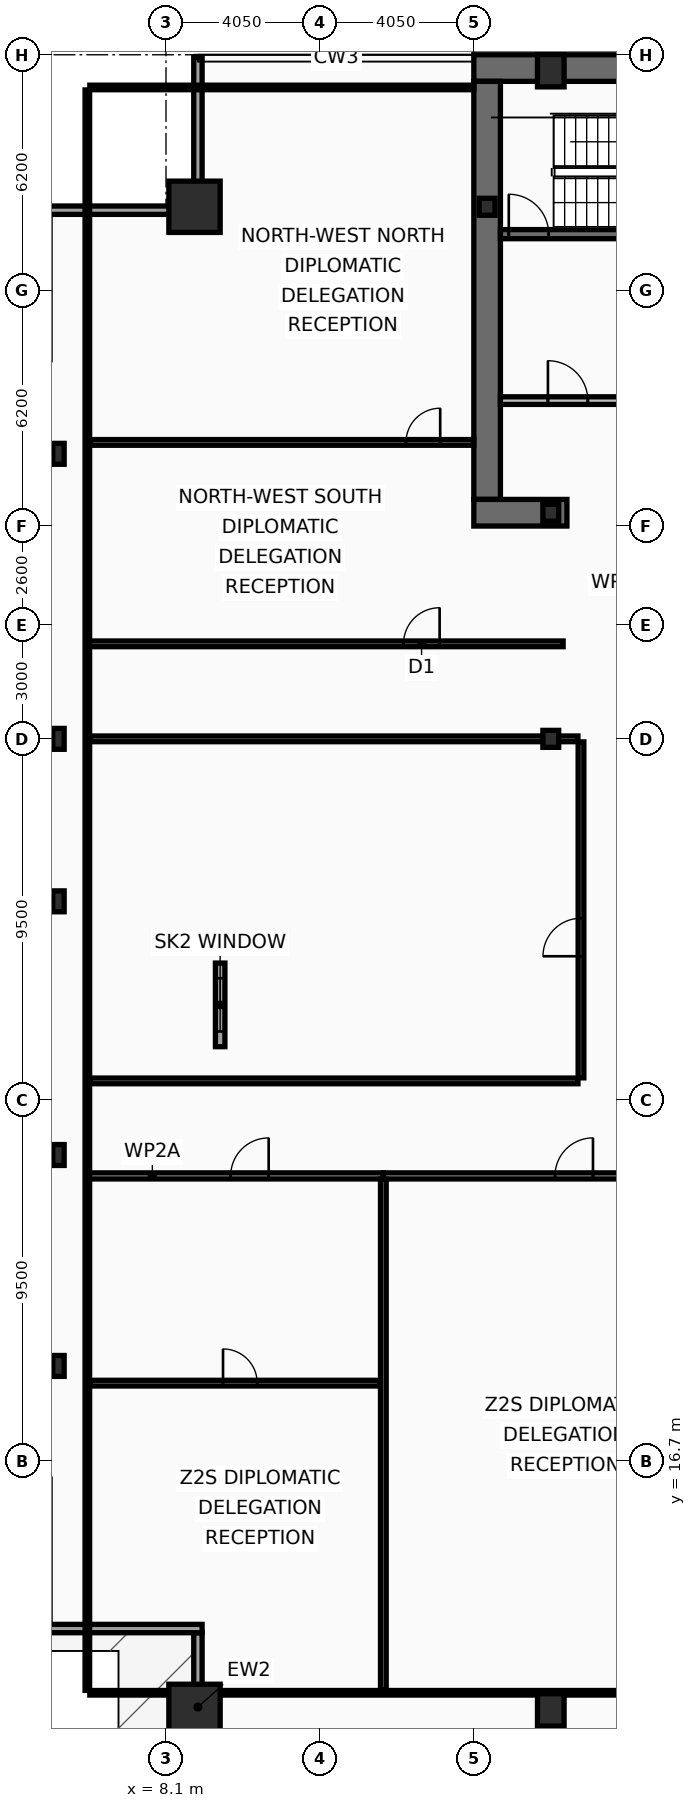
"""IFC4 building model, lengths in metres.
Left out: names, types, materials, properties, quantities, classifications, styles, units other than length and angle.
Written with IfcOpenShell. Run it as: python <this file> out.ifc"""

import sys

from ifc_helpers import new_model, si_unit, direction, frame, frame_2d, origin, origin_2d, place, context, subcontext, project, spatial, rectangle, hollow_rectangle, i_section, extrude, element, fill, save


model = new_model("IFC4")
c1 = context("Model", 3, precision=1e-05, world=origin(), true_north=direction((0.0, 1.0)))
c2 = subcontext(c1, "Body", "Model", "MODEL_VIEW")
j1 = project(units=[si_unit("LENGTHUNIT", "METRE"), si_unit("PLANEANGLEUNIT", "RADIAN")], contexts=[c1])
p1 = place(None, origin())
s1 = spatial("IfcSite", under=j1, at=p1, CompositionType="ELEMENT")
p2 = place(p1, origin())
s2 = spatial("IfcBuilding", under=s1, at=p2, CompositionType="ELEMENT")
p3 = place(p2, frame((0.0, 0.0, 136.2)))
s3 = spatial("IfcBuildingStorey", under=s2, at=p3, CompositionType="ELEMENT", Elevation=136.2)
p4 = place(p3, frame((16.2, 53.35, 0.0), z_axis=(0.0, 0.0, 1.0), x_axis=(1.0, 0.0, 0.0)))
e1 = element("IfcWall", 1, at=p4, inside=s3, PredefinedType="SHEAR", context=c2, shape_type="SweptSolid", body=[
    extrude(rectangle(XDim=40.5, YDim=0.7, at=frame_2d((20.25, 0.0))), origin(), (0.0, 0.0, 1.0), 3.44),
])
p5 = place(p3, frame((16.55, 42.0, 0.0), z_axis=(0.0, 0.0, 1.0), x_axis=(0.0, 1.0, 0.0)))
e2 = element("IfcWall", 2, at=p5, inside=s3, PredefinedType="SHEAR", context=c2, shape_type="SweptSolid", body=[
    extrude(rectangle(XDim=11.0, YDim=0.7, at=frame_2d((5.5, 0.0))), origin(), (0.0, 0.0, 1.0), 3.44),
])
p6 = place(p3, frame((18.65, 41.65, 0.0), z_axis=(0.0, 0.0, 1.0), x_axis=(-1.0, 0.0, 0.0)))
e3 = element("IfcWall", 3, at=p6, inside=s3, PredefinedType="SHEAR", context=c2, shape_type="SweptSolid", body=[
    extrude(rectangle(XDim=2.45, YDim=0.7, at=frame_2d((1.225, 0.0))), origin(), (0.0, 0.0, 1.0), 3.44),
])
p7 = place(p3, frame((16.9, 48.98, 0.0), z_axis=(0.0, 0.0, 1.0), x_axis=(1.0, 0.0, 0.0)))
e4 = element("IfcWall", 4, at=p7, inside=s3, PredefinedType="SHEAR", context=c2, shape_type="SweptSolid", body=[
    extrude(rectangle(XDim=7.32, YDim=0.24, at=frame_2d((3.66, 0.0))), origin(), (0.0, 0.0, 1.0), 3.44),
])
p8 = place(p7, frame((0.22, 0.0, 0.0)))
e5 = element("IfcOpeningElement", 5, at=p8, cuts=e4, PredefinedType="OPENING", context=c2, shape_type="SweptSolid", body=[
    extrude(rectangle(XDim=1.05, YDim=2.15, at=frame_2d((0.525, 1.075))), frame((0.0, 0.13, 0.0), z_axis=(0.0, -1.0, 0.0), x_axis=(1.0, 0.0, 0.0)), (0.0, 0.0, 1.0), 0.26),
])
for number, where, z_axis, x_axis in (
    (6, (8.85, 10.15, 0.0), (0.0, 0.0, 1.0), (1.0, 0.0, 0.0)),
    (7, (8.85, 49.7, 0.0), (0.0, 0.0, 1.0), (1.0, 0.0, 0.0)),
):
    element("IfcColumn", number, at=place(p3, frame(where, z_axis=z_axis, x_axis=x_axis)), inside=s3, PredefinedType="COLUMN", context=c2, shape_type="SweptSolid", body=[
        extrude(hollow_rectangle(XDim=1.35, YDim=1.35, WallThickness=0.065, at=origin_2d()), origin(), (0.0, 0.0, 1.0), 3.6),
    ])
for number, where, z_axis, x_axis in (
    (8, (18.225, 10.15, 0.0), (0.0, 0.0, 1.0), (1.0, 0.0, 0.0)),
    (9, (18.225, 53.28, 0.0), (0.0, 0.0, 1.0), (1.0, 0.0, 0.0)),
):
    element("IfcColumn", number, at=place(p3, frame(where, z_axis=z_axis, x_axis=x_axis)), inside=s3, PredefinedType="COLUMN", context=c2, shape_type="SweptSolid", body=[
        extrude(hollow_rectangle(XDim=0.7, YDim=0.85, WallThickness=0.05, at=origin_2d()), origin(), (0.0, 0.0, 1.0), 3.6),
    ])
for number, where, z_axis, x_axis in (
    (10, (5.27, 19.2, 0.0), (0.0, 0.0, 1.0), (1.0, 0.0, 0.0)),
    (11, (5.27, 24.75, 0.0), (0.0, 0.0, 1.0), (1.0, 0.0, 0.0)),
    (12, (5.27, 31.425, 0.0), (0.0, 0.0, 1.0), (1.0, 0.0, 0.0)),
    (13, (5.27, 35.7, 0.0), (0.0, 0.0, 1.0), (1.0, 0.0, 0.0)),
    (14, (5.27, 43.2, 0.0), (0.0, 0.0, 1.0), (1.0, 0.0, 0.0)),
):
    element("IfcColumn", number, at=place(p3, frame(where, z_axis=z_axis, x_axis=x_axis)), inside=s3, PredefinedType="COLUMN", context=c2, shape_type="SweptSolid", body=[
        extrude(i_section(OverallWidth=0.3, OverallDepth=0.55, WebThickness=0.015, FlangeThickness=0.029, at=origin_2d()), origin(), (0.0, 0.0, 1.0), 3.6),
    ])
for number, where, z_axis, x_axis in (
    (15, (16.55, 49.7, 0.0), (0.0, 0.0, 1.0), (1.0, 0.0, 0.0)),
    (16, (18.225, 35.7, 0.0), (0.0, 0.0, 1.0), (1.0, 0.0, 0.0)),
    (17, (18.225, 41.65, 0.0), (0.0, 0.0, 1.0), (1.0, 0.0, 0.0)),
):
    element("IfcColumn", number, at=place(p3, frame(where, z_axis=z_axis, x_axis=x_axis)), inside=s3, PredefinedType="COLUMN", context=c2, shape_type="SweptSolid", body=[
        extrude(i_section(OverallWidth=0.416, OverallDepth=0.446, WebThickness=0.039, FlangeThickness=0.063, at=origin_2d()), origin(), (0.0, 0.0, 1.0), 3.6),
    ])
p9 = place(p3, frame((8.94, 8.27, 0.0), z_axis=(0.0, 0.0, 1.0), x_axis=(0.0, 1.0, 0.0)))
e18 = element("IfcWall", 18, at=p9, inside=s3, PredefinedType="SOLIDWALL", context=c2, shape_type="SweptSolid", body=[
    extrude(rectangle(XDim=3.91, YDim=0.22, at=frame_2d((1.955, 0.0))), origin(), (0.0, 0.0, 1.0), 2.83),
])
for number, where, z_axis, x_axis in (
    (19, (9.05, 12.29, 0.0), (0.0, 0.0, 1.0), (-1.0, 0.0, 0.0)),
    (20, (4.83, 49.61, 0.0), (0.0, 0.0, 1.0), (1.0, 0.0, 0.0)),
):
    element("IfcWall", number, at=place(p3, frame(where, z_axis=z_axis, x_axis=x_axis)), inside=s3, PredefinedType="SOLIDWALL", context=c2, shape_type="SweptSolid", body=[
        extrude(rectangle(XDim=4.22, YDim=0.22, at=frame_2d((2.11, 0.0))), origin(), (0.0, 0.0, 1.0), 2.83),
    ])
p10 = place(p3, frame((8.94, 49.72, 0.0), z_axis=(0.0, 0.0, 1.0), x_axis=(0.0, 1.0, 0.0)))
e21 = element("IfcWall", 21, at=p10, inside=s3, PredefinedType="SOLIDWALL", context=c2, shape_type="SweptSolid", body=[
    extrude(rectangle(XDim=3.91, YDim=0.22, at=frame_2d((1.955, 0.0))), origin(), (0.0, 0.0, 1.0), 2.83),
])
p11 = place(p3, frame((9.525, 27.6, 0.0), z_axis=(0.0, 0.0, 1.0), x_axis=(0.0, 1.0, 0.0)))
e22 = element("IfcWall", 22, at=p11, inside=s3, PredefinedType="PARAPET", context=c2, shape_type="SweptSolid", body=[
    extrude(rectangle(XDim=2.2, YDim=0.25, at=frame_2d((1.1, 0.0))), origin(), (0.0, 0.0, 1.0), 0.88),
])
p12 = place(p11, frame((0.4, 0.0, 0.16)))
e23 = element("IfcOpeningElement", 23, at=p12, cuts=e22, PredefinedType="OPENING", context=c2, shape_type="SweptSolid", body=[
    extrude(rectangle(XDim=1.4, YDim=0.5, at=frame_2d((0.7, 0.25))), frame((0.0, 0.135, 0.0), z_axis=(0.0, -1.0, 0.0), x_axis=(1.0, 0.0, 0.0)), (0.0, 0.0, 1.0), 0.27),
])
p13 = place(p3, frame((16.9, 44.6, 0.0), z_axis=(0.0, 0.0, 1.0), x_axis=(1.0, 0.0, 0.0)))
e24 = element("IfcWall", 24, at=p13, inside=s3, PredefinedType="PARTITIONING", context=c2, shape_type="SweptSolid", body=[
    extrude(rectangle(XDim=4.1, YDim=0.2, at=frame_2d((2.05, 0.0))), origin(), (0.0, 0.0, 1.0), 3.44),
])
p14 = place(p13, frame((1.25, 0.0, 0.0)))
e25 = element("IfcOpeningElement", 25, at=p14, cuts=e24, PredefinedType="OPENING", context=c2, shape_type="SweptSolid", body=[
    extrude(rectangle(XDim=1.05, YDim=2.15, at=frame_2d((0.525, 1.075))), frame((0.0, 0.11, 0.0), z_axis=(0.0, -1.0, 0.0), x_axis=(1.0, 0.0, 0.0)), (0.0, 0.0, 1.0), 0.22),
])
p15 = place(p3, frame((6.03, 38.2, 0.0), z_axis=(0.0, 0.0, 1.0), x_axis=(1.0, 0.0, 0.0)))
e26 = element("IfcWall", 26, at=p15, inside=s3, PredefinedType="PARTITIONING", context=c2, shape_type="SweptSolid", body=[
    extrude(rectangle(XDim=12.52, YDim=0.15, at=frame_2d((6.26, 0.0))), origin(), (0.0, 0.0, 1.0), 2.73),
])
p16 = place(p15, frame((8.32, 0.0, 0.0)))
e27 = element("IfcOpeningElement", 27, at=p16, cuts=e26, PredefinedType="OPENING", context=c2, shape_type="SweptSolid", body=[
    extrude(rectangle(XDim=0.95, YDim=2.05, at=frame_2d((0.475, 1.025))), frame((0.0, 0.085, 0.0), z_axis=(0.0, -1.0, 0.0), x_axis=(1.0, 0.0, 0.0)), (0.0, 0.0, 1.0), 0.17),
])
p17 = place(p3, frame((6.095, 43.5, 0.0), z_axis=(0.0, 0.0, 1.0), x_axis=(1.0, 0.0, 0.0)))
e28 = element("IfcWall", 28, at=p17, inside=s3, PredefinedType="PARTITIONING", context=c2, shape_type="SweptSolid", body=[
    extrude(rectangle(XDim=10.105, YDim=0.15, at=frame_2d((5.052, 0.0))), origin(), (0.0, 0.0, 1.0), 2.73),
])
p18 = place(p17, frame((8.32, 0.0, 0.0)))
e29 = element("IfcOpeningElement", 29, at=p18, cuts=e28, PredefinedType="OPENING", context=c2, shape_type="SweptSolid", body=[
    extrude(rectangle(XDim=0.9, YDim=2.05, at=frame_2d((0.45, 1.025))), frame((0.0, 0.085, 0.0), z_axis=(0.0, -1.0, 0.0), x_axis=(1.0, 0.0, 0.0)), (0.0, 0.0, 1.0), 0.17),
])
p19 = place(p3, frame((6.03, 24.2, 0.0), z_axis=(0.0, 0.0, 1.0), x_axis=(1.0, 0.0, 0.0)))
e30 = element("IfcWall", 30, at=p19, inside=s3, PredefinedType="PARTITIONING", context=c2, shape_type="SweptSolid", body=[
    extrude(rectangle(XDim=7.789, YDim=0.16, at=frame_2d((3.895, 0.0))), origin(), (0.0, 0.0, 1.0), 3.44),
])
p20 = place(p19, frame((3.771, 0.0, 0.0)))
e31 = element("IfcOpeningElement", 31, at=p20, cuts=e30, PredefinedType="OPENING", context=c2, shape_type="SweptSolid", body=[
    extrude(rectangle(XDim=1.0, YDim=2.05, at=frame_2d((0.5, 1.025))), frame((0.0, 0.09, 0.0), z_axis=(0.0, -1.0, 0.0), x_axis=(1.0, 0.0, 0.0)), (0.0, 0.0, 1.0), 0.18),
])
p21 = place(p3, frame((6.095, 18.747, 0.0), z_axis=(0.0, 0.0, 1.0), x_axis=(1.0, 0.0, 0.0)))
e32 = element("IfcWall", 32, at=p21, inside=s3, PredefinedType="PARTITIONING", context=c2, shape_type="SweptSolid", body=[
    extrude(rectangle(XDim=7.644, YDim=0.15, at=frame_2d((3.822, 0.0))), origin(), (0.0, 0.0, 1.0), 2.73),
])
p22 = place(p21, frame((3.505, 0.0, 0.0)))
e33 = element("IfcOpeningElement", 33, at=p22, cuts=e32, PredefinedType="OPENING", context=c2, shape_type="SweptSolid", body=[
    extrude(rectangle(XDim=0.9, YDim=2.05, at=frame_2d((0.45, 1.025))), frame((0.0, 0.085, 0.0), z_axis=(0.0, -1.0, 0.0), x_axis=(1.0, 0.0, 0.0)), (0.0, 0.0, 1.0), 0.17),
])
p23 = place(p3, frame((13.819, 24.2, 0.0), z_axis=(0.0, 0.0, 1.0), x_axis=(1.0, 0.0, 0.0)))
e34 = element("IfcWall", 34, at=p23, inside=s3, PredefinedType="PARTITIONING", context=c2, shape_type="SweptSolid", body=[
    extrude(rectangle(XDim=9.563, YDim=0.16, at=frame_2d((4.781, 0.0))), origin(), (0.0, 0.0, 1.0), 2.73),
])
p24 = place(p23, frame((4.516, 0.0, 0.0)))
e35 = element("IfcOpeningElement", 35, at=p24, cuts=e34, PredefinedType="OPENING", context=c2, shape_type="SweptSolid", body=[
    extrude(rectangle(XDim=1.0, YDim=2.05, at=frame_2d((0.5, 1.025))), frame((0.0, 0.09, 0.0), z_axis=(0.0, -1.0, 0.0), x_axis=(1.0, 0.0, 0.0)), (0.0, 0.0, 1.0), 0.18),
])
p25 = place(p3, frame((13.819, 10.665, 0.0), z_axis=(0.0, 0.0, 1.0), x_axis=(0.0, 1.0, 0.0)))
e36 = element("IfcWall", 36, at=p25, inside=s3, PredefinedType="PARTITIONING", context=c2, shape_type="SweptSolid", body=[
    extrude(rectangle(XDim=13.45, YDim=0.15, at=frame_2d((6.725, 0.0))), origin(), (0.0, 0.0, 1.0), 2.73),
])
p26 = place(p3, frame((19.02, 26.78, 0.0), z_axis=(0.0, 0.0, 1.0), x_axis=(0.0, 1.0, 0.0)))
e37 = element("IfcWall", 37, at=p26, inside=s3, PredefinedType="PARTITIONING", context=c2, shape_type="SweptSolid", body=[
    extrude(rectangle(XDim=8.84, YDim=0.15, at=frame_2d((4.42, 0.0))), origin(), (0.0, 0.0, 1.0), 2.93),
])
p27 = place(p26, frame((3.2, 0.0, 0.0)))
e38 = element("IfcOpeningElement", 38, at=p27, cuts=e37, PredefinedType="OPENING", context=c2, shape_type="SweptSolid", body=[
    extrude(rectangle(XDim=1.0, YDim=2.05, at=frame_2d((0.5, 1.025))), frame((0.0, 0.085, 0.0), z_axis=(0.0, -1.0, 0.0), x_axis=(1.0, 0.0, 0.0)), (0.0, 0.0, 1.0), 0.17),
])
for number, where, z_axis, x_axis in (
    (39, (6.095, 26.7, 0.0), (0.0, 0.0, 1.0), (1.0, 0.0, 0.0)),
    (40, (6.095, 35.7, 0.0), (0.0, 0.0, 1.0), (1.0, 0.0, 0.0)),
):
    element("IfcWall", number, at=place(p3, frame(where, z_axis=z_axis, x_axis=x_axis)), inside=s3, PredefinedType="PARTITIONING", context=c2, shape_type="SweptSolid", body=[
        extrude(rectangle(XDim=12.845, YDim=0.15, at=frame_2d((6.422, 0.0))), origin(), (0.0, 0.0, 1.0), 2.73),
    ])
p28 = place(p3, frame((6.03, 10.665, 0.0), z_axis=(0.0, 0.0, 1.0), x_axis=(0.0, 1.0, 0.0)))
e41 = element("IfcWall", 41, at=p28, inside=s3, PredefinedType="PARTITIONING", context=c2, shape_type="SweptSolid", body=[
    extrude(rectangle(XDim=42.11, YDim=0.12, at=frame_2d((21.055, 0.0))), origin(), (0.0, 0.0, 1.0), 2.73),
])
p29 = place(p3, frame((6.095, 52.84, 0.0), z_axis=(0.0, 0.0, 1.0), x_axis=(1.0, 0.0, 0.0)))
e42 = element("IfcWall", 42, at=p29, inside=s3, PredefinedType="PARTITIONING", context=c2, shape_type="SweptSolid", body=[
    extrude(rectangle(XDim=10.105, YDim=0.12, at=frame_2d((5.052, 0.0))), origin(), (0.0, 0.0, 1.0), 3.44),
])
p30 = place(p3, frame((6.095, 10.6, 0.0), z_axis=(0.0, 0.0, 1.0), x_axis=(1.0, 0.0, 0.0)))
e43 = element("IfcWall", 43, at=p30, inside=s3, PredefinedType="PARTITIONING", context=c2, shape_type="SweptSolid", body=[
    extrude(rectangle(XDim=60.71, YDim=0.12, at=frame_2d((30.355, 0.0))), origin(), (0.0, 0.0, 1.0), 2.73),
])
p31 = place(p12, origin())
e44 = element("IfcWindow", 44, at=p31, inside=s3, PartitioningType="SINGLE_PANEL", PredefinedType="SKYLIGHT", context=c2, shape_type="SweptSolid", body=[
    extrude(rectangle(XDim=1.4, YDim=0.5, at=frame_2d((0.7, 0.25))), frame((0.0, 0.03, 0.0), z_axis=(0.0, -1.0, 0.0), x_axis=(1.0, 0.0, 0.0)), (0.0, 0.0, 1.0), 0.06),
])
fill(e23, e44)
p32 = place(p8, origin())
e45 = element("IfcDoor", 45, at=p32, inside=s3, OperationType="SINGLE_SWING_LEFT", PredefinedType="DOOR", context=c2, shape_type="SweptSolid", body=[
    extrude(rectangle(XDim=1.05, YDim=2.15, at=frame_2d((0.525, 1.075))), frame((0.0, 0.025, 0.0), z_axis=(0.0, -1.0, 0.0), x_axis=(1.0, 0.0, 0.0)), (0.0, 0.0, 1.0), 0.05),
])
fill(e5, e45)
p33 = place(p14, origin())
e46 = element("IfcDoor", 46, at=p33, inside=s3, OperationType="SINGLE_SWING_LEFT", PredefinedType="DOOR", context=c2, shape_type="SweptSolid", body=[
    extrude(rectangle(XDim=1.05, YDim=2.15, at=frame_2d((0.525, 1.075))), frame((0.0, 0.025, 0.0), z_axis=(0.0, -1.0, 0.0), x_axis=(1.0, 0.0, 0.0)), (0.0, 0.0, 1.0), 0.05),
])
fill(e25, e46)
p34 = place(p16, origin())
e47 = element("IfcDoor", 47, at=p34, inside=s3, OperationType="SINGLE_SWING_RIGHT", PredefinedType="DOOR", context=c2, shape_type="SweptSolid", body=[
    extrude(rectangle(XDim=0.95, YDim=2.05, at=frame_2d((0.475, 1.025))), frame((0.0, 0.025, 0.0), z_axis=(0.0, -1.0, 0.0), x_axis=(1.0, 0.0, 0.0)), (0.0, 0.0, 1.0), 0.05),
])
fill(e27, e47)
p35 = place(p18, origin())
e48 = element("IfcDoor", 48, at=p35, inside=s3, OperationType="SINGLE_SWING_RIGHT", PredefinedType="DOOR", context=c2, shape_type="SweptSolid", body=[
    extrude(rectangle(XDim=0.9, YDim=2.05, at=frame_2d((0.45, 1.025))), frame((0.0, 0.025, 0.0), z_axis=(0.0, -1.0, 0.0), x_axis=(1.0, 0.0, 0.0)), (0.0, 0.0, 1.0), 0.05),
])
fill(e29, e48)
p36 = place(p20, origin())
e49 = element("IfcDoor", 49, at=p36, inside=s3, OperationType="SINGLE_SWING_RIGHT", PredefinedType="DOOR", context=c2, shape_type="SweptSolid", body=[
    extrude(rectangle(XDim=1.0, YDim=2.05, at=frame_2d((0.5, 1.025))), frame((0.0, 0.025, 0.0), z_axis=(0.0, -1.0, 0.0), x_axis=(1.0, 0.0, 0.0)), (0.0, 0.0, 1.0), 0.05),
])
fill(e31, e49)
p37 = place(p22, origin())
e50 = element("IfcDoor", 50, at=p37, inside=s3, OperationType="SINGLE_SWING_LEFT", PredefinedType="DOOR", context=c2, shape_type="SweptSolid", body=[
    extrude(rectangle(XDim=0.9, YDim=2.05, at=frame_2d((0.45, 1.025))), frame((0.0, 0.025, 0.0), z_axis=(0.0, -1.0, 0.0), x_axis=(1.0, 0.0, 0.0)), (0.0, 0.0, 1.0), 0.05),
])
fill(e33, e50)
p38 = place(p24, origin())
e51 = element("IfcDoor", 51, at=p38, inside=s3, OperationType="SINGLE_SWING_RIGHT", PredefinedType="DOOR", context=c2, shape_type="SweptSolid", body=[
    extrude(rectangle(XDim=1.0, YDim=2.05, at=frame_2d((0.5, 1.025))), frame((0.0, 0.025, 0.0), z_axis=(0.0, -1.0, 0.0), x_axis=(1.0, 0.0, 0.0)), (0.0, 0.0, 1.0), 0.05),
])
fill(e35, e51)
p39 = place(p27, origin())
e52 = element("IfcDoor", 52, at=p39, inside=s3, OperationType="SINGLE_SWING_LEFT", PredefinedType="DOOR", context=c2, shape_type="SweptSolid", body=[
    extrude(rectangle(XDim=1.0, YDim=2.05, at=frame_2d((0.5, 1.025))), frame((0.0, 0.025, 0.0), z_axis=(0.0, -1.0, 0.0), x_axis=(1.0, 0.0, 0.0)), (0.0, 0.0, 1.0), 0.05),
])
fill(e38, e52)
save(model, sys.argv[1])
